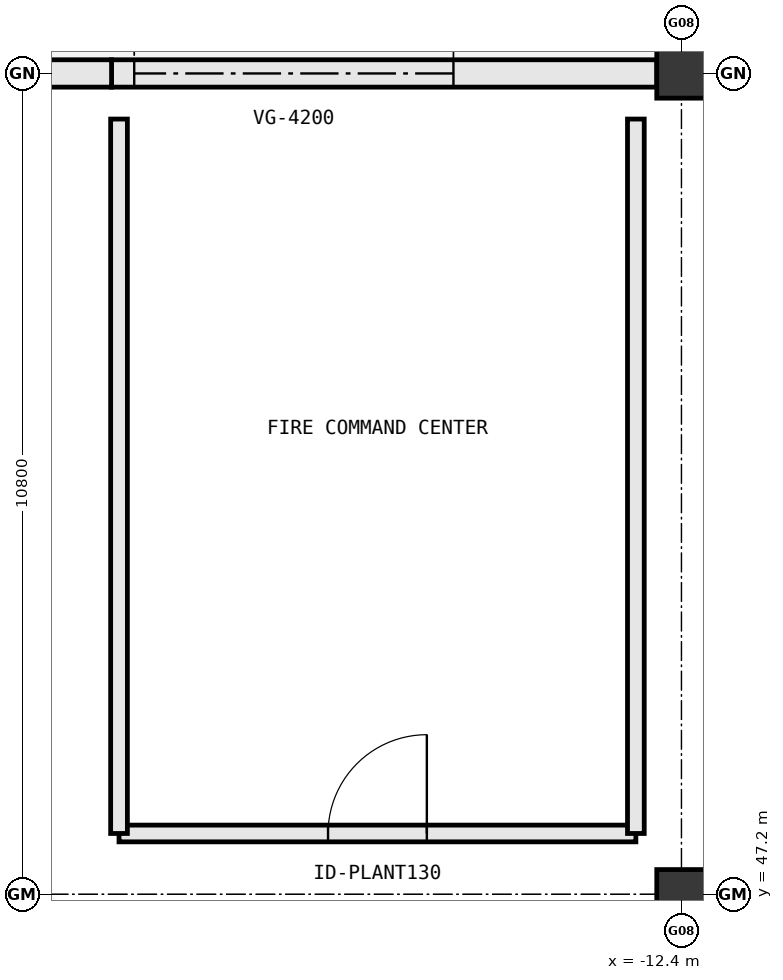
"""IFC4 building model, lengths in metres.
Left out: names, types, materials, properties, quantities, classifications, styles, units other than length and angle.
Written with IfcOpenShell. Run it as: python <this file> out.ifc"""

import sys

from ifc_helpers import new_model, si_unit, direction, frame, frame_2d, origin, origin_2d, place, context, subcontext, project, spatial, rectangle, extrude, element, fill, save


model = new_model("IFC4")
c1 = context("Model", 3, precision=1e-05, world=origin(), true_north=direction((0.0, 1.0)))
c2 = subcontext(c1, "Body", "Model", "MODEL_VIEW")
j1 = project(units=[si_unit("LENGTHUNIT", "METRE"), si_unit("PLANEANGLEUNIT", "RADIAN")], contexts=[c1])
p1 = place(None, origin())
s1 = spatial("IfcSite", under=j1, at=p1, CompositionType="ELEMENT")
p2 = place(p1, origin())
s2 = spatial("IfcBuilding", under=s1, at=p2, CompositionType="ELEMENT")
p3 = place(p2, origin())
s3 = spatial("IfcBuildingStorey", under=s2, at=p3, CompositionType="ELEMENT", Elevation=0.0)
for number, where, z_axis, x_axis in (
    (1, (-12.4, 47.2, 0.0), (0.0, 0.0, 1.0), (1.0, 0.0, 0.0)),
    (2, (-12.4, 58.0, 0.0), (0.0, 0.0, 1.0), (1.0, 0.0, 0.0)),
):
    element("IfcColumn", number, at=place(p3, frame(where, z_axis=z_axis, x_axis=x_axis)), inside=s3, PredefinedType="COLUMN", context=c2, shape_type="SweptSolid", body=[
        extrude(rectangle(XDim=0.65, YDim=0.65, at=origin_2d()), origin(), (0.0, 0.0, 1.0), 5.4),
    ])
p4 = place(p3, frame((-12.723, 58.0, 0.0), z_axis=(0.0, 0.0, 1.0), x_axis=(-1.0, 0.0, 0.0)))
e3 = element("IfcWall", 3, at=p4, inside=s3, PredefinedType="STANDARD", context=c2, shape_type="SweptSolid", body=[
    extrude(rectangle(XDim=7.179, YDim=0.36, at=frame_2d((3.59, 0.0))), origin(), (0.0, 0.0, 1.0), 4.336),
])
p5 = place(p4, frame((2.677, 0.0, 0.0)))
e4 = element("IfcOpeningElement", 4, at=p5, cuts=e3, PredefinedType="OPENING", context=c2, shape_type="SweptSolid", body=[
    extrude(rectangle(XDim=4.2, YDim=3.6, at=frame_2d((2.1, 1.8))), frame((0.0, 0.192, 0.0), z_axis=(0.0, -1.0, 0.0), x_axis=(1.0, 0.0, 0.0)), (0.0, 0.0, 1.0), 0.384),
])
p6 = place(p3, frame((-19.898, 58.0, 0.0), z_axis=(0.0, 0.0, 1.0), x_axis=(-1.0, 0.0, 0.0)))
e5 = element("IfcWall", 5, at=p6, inside=s3, PredefinedType="STANDARD", context=c2, shape_type="SweptSolid", body=[
    extrude(rectangle(XDim=7.179, YDim=0.36, at=frame_2d((3.589, 0.0))), origin(), (0.0, 0.0, 1.0), 4.336),
])
p7 = place(p6, frame((2.49, 0.0, 2.4)))
e6 = element("IfcOpeningElement", 6, at=p7, cuts=e5, PredefinedType="OPENING", context=c2, shape_type="SweptSolid", body=[
    extrude(rectangle(XDim=2.2, YDim=0.95, at=frame_2d((1.1, 0.475))), frame((0.0, 0.192, 0.0), z_axis=(0.0, -1.0, 0.0), x_axis=(1.0, 0.0, 0.0)), (0.0, 0.0, 1.0), 0.384),
])
p8 = place(p3, frame((-19.8, 48.0, 0.0), z_axis=(0.0, 0.0, 1.0), x_axis=(1.0, 0.0, 0.0)))
e7 = element("IfcWall", 7, at=p8, inside=s3, PredefinedType="STANDARD", context=c2, shape_type="SweptSolid", body=[
    extrude(rectangle(XDim=6.8, YDim=0.22, at=frame_2d((3.4, 0.0))), origin(), (0.0, 0.0, 1.0), 5.12),
])
p9 = place(p8, frame((2.75, 0.0, 0.0)))
e8 = element("IfcOpeningElement", 8, at=p9, cuts=e7, PredefinedType="OPENING", context=c2, shape_type="SweptSolid", body=[
    extrude(rectangle(XDim=1.3, YDim=2.2, at=frame_2d((0.65, 1.1))), frame((0.0, 0.122, 0.0), z_axis=(0.0, -1.0, 0.0), x_axis=(1.0, 0.0, 0.0)), (0.0, 0.0, 1.0), 0.244),
])
for number, where, z_axis, x_axis in (
    (9, (-13.0, 48.0, 0.0), (0.0, 0.0, 1.0), (0.0, 1.0, 0.0)),
    (10, (-19.8, 57.4, 0.0), (0.0, 0.0, 1.0), (0.0, -1.0, 0.0)),
):
    element("IfcWall", number, at=place(p3, frame(where, z_axis=z_axis, x_axis=x_axis)), inside=s3, PredefinedType="STANDARD", context=c2, shape_type="SweptSolid", body=[
        extrude(rectangle(XDim=9.4, YDim=0.22, at=frame_2d((4.7, 0.0))), origin(), (0.0, 0.0, 1.0), 5.12),
    ])
p10 = place(p5, frame((4.2, 0.0, 0.0), z_axis=(0.0, 0.0, 1.0), x_axis=(-1.0, 0.0, 0.0)))
e11 = element("IfcDoor", 11, at=p10, inside=s3, OperationType="ROLLINGUP", PredefinedType="TRAPDOOR", context=c2, shape_type="SweptSolid", body=[
    extrude(rectangle(XDim=4.2, YDim=3.6, at=frame_2d((2.1, 1.8))), frame((0.0, 0.025, 0.0), z_axis=(0.0, -1.0, 0.0), x_axis=(1.0, 0.0, 0.0)), (0.0, 0.0, 1.0), 0.05),
])
fill(e4, e11)
p11 = place(p9, origin())
e12 = element("IfcDoor", 12, at=p11, inside=s3, OperationType="SINGLE_SWING_RIGHT", PredefinedType="DOOR", context=c2, shape_type="SweptSolid", body=[
    extrude(rectangle(XDim=1.3, YDim=2.2, at=frame_2d((0.65, 1.1))), frame((0.0, 0.025, 0.0), z_axis=(0.0, -1.0, 0.0), x_axis=(1.0, 0.0, 0.0)), (0.0, 0.0, 1.0), 0.05),
])
fill(e8, e12)
save(model, sys.argv[1])
